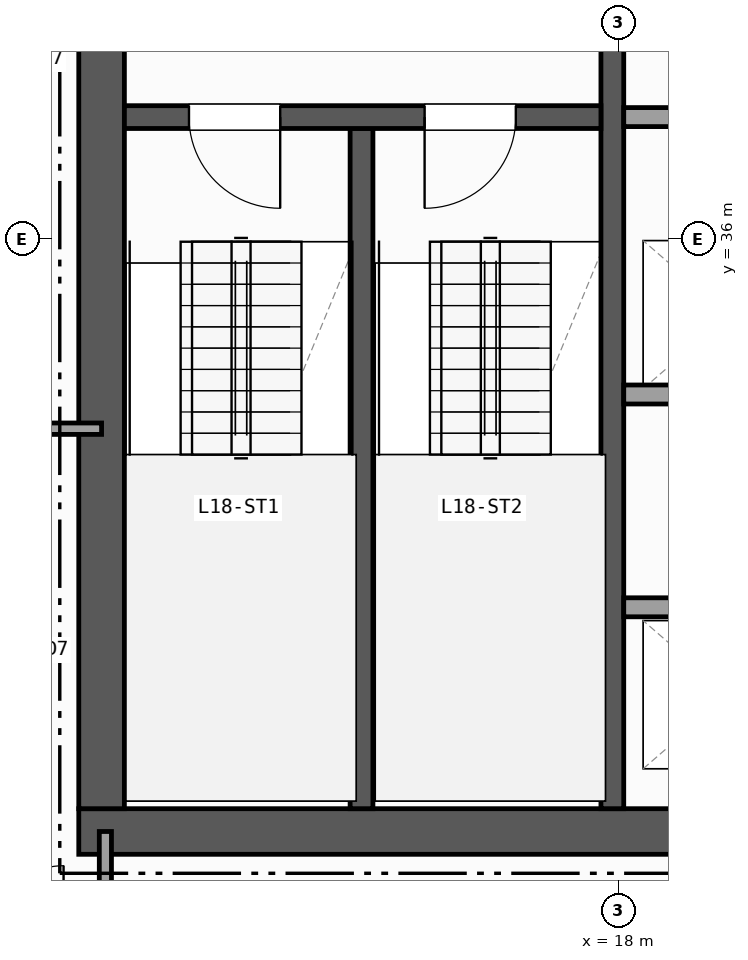
"""IFC4 building model, lengths in metres.
Left out: names, types, materials, properties, quantities, classifications, styles, units other than length and angle.
Written with IfcOpenShell. Run it as: python <this file> out.ifc"""

import sys

from ifc_helpers import new_model, si_unit, direction, frame, frame_2d, origin, place, context, subcontext, project, spatial, rectangle, extrude, element, fill, save


model = new_model("IFC4")
c1 = context("Model", 3, precision=1e-05, world=origin(), true_north=direction((0.0, 1.0)))
c2 = subcontext(c1, "Body", "Model", "MODEL_VIEW")
j1 = project(units=[si_unit("LENGTHUNIT", "METRE"), si_unit("PLANEANGLEUNIT", "RADIAN")], contexts=[c1])
p1 = place(None, origin())
s1 = spatial("IfcSite", under=j1, at=p1, CompositionType="ELEMENT")
p2 = place(p1, origin())
s2 = spatial("IfcBuilding", under=s1, at=p2, CompositionType="ELEMENT")
p3 = place(p2, frame((0.0, 0.0, 76.7)))
s3 = spatial("IfcBuildingStorey", under=s2, at=p3, CompositionType="ELEMENT", Elevation=76.7)
p4 = place(p3, frame((10.9, 28.2, 0.0), z_axis=(0.0, 0.0, 1.0), x_axis=(1.0, 0.0, 0.0)))
e1 = element("IfcWall", 1, at=p4, inside=s3, PredefinedType="SHEAR", context=c2, shape_type="SweptSolid", body=[
    extrude(rectangle(XDim=14.0, YDim=0.6, at=frame_2d((7.0, 0.0))), origin(), (0.0, 0.0, 1.0), 3.42),
])
p5 = place(p3, frame((11.2, 42.1, 0.0), z_axis=(0.0, 0.0, 1.0), x_axis=(0.0, -1.0, 0.0)))
e2 = element("IfcWall", 2, at=p5, inside=s3, PredefinedType="SHEAR", context=c2, shape_type="SweptSolid", body=[
    extrude(rectangle(XDim=13.6, YDim=0.6, at=frame_2d((6.8, 0.0))), origin(), (0.0, 0.0, 1.0), 3.42),
])
p6 = place(p3, frame((14.62, 28.5, 0.0), z_axis=(0.0, 0.0, 1.0), x_axis=(0.0, 1.0, 0.0)))
e3 = element("IfcWall", 3, at=p6, inside=s3, PredefinedType="SHEAR", context=c2, shape_type="SweptSolid", body=[
    extrude(rectangle(XDim=8.95, YDim=0.3, at=frame_2d((4.475, 0.0))), origin(), (0.0, 0.0, 1.0), 3.42),
])
p7 = place(p3, frame((17.92, 42.1, 0.0), z_axis=(0.0, 0.0, 1.0), x_axis=(0.0, -1.0, 0.0)))
e4 = element("IfcWall", 4, at=p7, inside=s3, PredefinedType="SHEAR", context=c2, shape_type="SweptSolid", body=[
    extrude(rectangle(XDim=13.6, YDim=0.3, at=frame_2d((6.8, 0.0))), origin(), (0.0, 0.0, 1.0), 3.42),
])
p8 = place(p7, frame((1.925, 0.0, 0.0)))
e5 = element("IfcOpeningElement", 5, at=p8, cuts=e4, PredefinedType="OPENING", context=c2, shape_type="SweptSolid", body=[
    extrude(rectangle(XDim=1.15, YDim=2.15, at=frame_2d((0.575, 1.075))), frame((0.0, 0.16, 0.0), z_axis=(0.0, -1.0, 0.0), x_axis=(1.0, 0.0, 0.0)), (0.0, 0.0, 1.0), 0.32),
])
p9 = place(p3, frame((17.77, 37.6, 0.0), z_axis=(0.0, 0.0, 1.0), x_axis=(-1.0, 0.0, 0.0)))
e6 = element("IfcWall", 6, at=p9, inside=s3, PredefinedType="SHEAR", context=c2, shape_type="SweptSolid", body=[
    extrude(rectangle(XDim=6.27, YDim=0.3, at=frame_2d((3.135, 0.0))), origin(), (0.0, 0.0, 1.0), 3.42),
])
p10 = place(p9, frame((4.22, 0.0, 0.0)))
e7 = element("IfcOpeningElement", 7, at=p10, cuts=e6, PredefinedType="OPENING", context=c2, shape_type="SweptSolid", body=[
    extrude(rectangle(XDim=1.2, YDim=2.15, at=frame_2d((0.6, 1.075))), frame((0.0, 0.16, 0.0), z_axis=(0.0, -1.0, 0.0), x_axis=(1.0, 0.0, 0.0)), (0.0, 0.0, 1.0), 0.32),
])
p11 = place(p9, frame((1.12, 0.0, 0.0)))
e8 = element("IfcOpeningElement", 8, at=p11, cuts=e6, PredefinedType="OPENING", context=c2, shape_type="SweptSolid", body=[
    extrude(rectangle(XDim=1.2, YDim=2.15, at=frame_2d((0.6, 1.075))), frame((0.0, 0.16, 0.0), z_axis=(0.0, -1.0, 0.0), x_axis=(1.0, 0.0, 0.0)), (0.0, 0.0, 1.0), 0.32),
])
for number, where, z_axis, x_axis in (
    (9, (18.07, 37.6, 0.0), (0.0, 0.0, 1.0), (1.0, 0.0, 0.0)),
    (10, (18.07, 31.15, 0.0), (0.0, 0.0, 1.0), (1.0, 0.0, 0.0)),
    (11, (24.3, 33.95, 0.0), (0.0, 0.0, 1.0), (-1.0, 0.0, 0.0)),
):
    element("IfcWall", number, at=place(p3, frame(where, z_axis=z_axis, x_axis=x_axis)), inside=s3, PredefinedType="PARTITIONING", context=c2, shape_type="SweptSolid", body=[
        extrude(rectangle(XDim=6.23, YDim=0.25, at=frame_2d((3.115, 0.0))), origin(), (0.0, 0.0, 1.0), 3.42),
    ])
p12 = place(p3, frame((9.0, 33.5, 0.0), z_axis=(0.0, 0.0, 1.0), x_axis=(1.0, 0.0, 0.0)))
e12 = element("IfcWall", 12, at=p12, inside=s3, PredefinedType="PARTITIONING", context=c2, shape_type="SweptSolid", body=[
    extrude(rectangle(XDim=2.2, YDim=0.15, at=frame_2d((1.1, 0.0))), origin(), (0.0, 0.0, 1.0), 2.627),
])
p13 = place(p12, frame((0.45, 0.0, 0.0)))
e13 = element("IfcOpeningElement", 13, at=p13, cuts=e12, PredefinedType="OPENING", context=c2, shape_type="SweptSolid", body=[
    extrude(rectangle(XDim=0.9, YDim=2.1, at=frame_2d((0.45, 1.05))), frame((0.0, 0.085, 0.0), z_axis=(0.0, -1.0, 0.0), x_axis=(1.0, 0.0, 0.0)), (0.0, 0.0, 1.0), 0.17),
])
p14 = place(p3, frame((11.25, 26.8, 0.0), z_axis=(0.0, 0.0, 1.0), x_axis=(0.0, 1.0, 0.0)))
e14 = element("IfcWall", 14, at=p14, inside=s3, PredefinedType="PARTITIONING", context=c2, shape_type="SweptSolid", body=[
    extrude(rectangle(XDim=1.4, YDim=0.16, at=frame_2d((0.7, 0.0))), origin(), (0.0, 0.0, 1.0), 2.789),
])
p15 = place(p10, origin())
e15 = element("IfcDoor", 15, at=p15, inside=s3, OperationType="SINGLE_SWING_LEFT", PredefinedType="DOOR", context=c2, shape_type="SweptSolid", body=[
    extrude(rectangle(XDim=1.2, YDim=2.15, at=frame_2d((0.6, 1.075))), frame((0.0, 0.025, 0.0), z_axis=(0.0, -1.0, 0.0), x_axis=(1.0, 0.0, 0.0)), (0.0, 0.0, 1.0), 0.05),
])
fill(e7, e15)
p16 = place(p11, origin())
e16 = element("IfcDoor", 16, at=p16, inside=s3, OperationType="SINGLE_SWING_RIGHT", PredefinedType="DOOR", context=c2, shape_type="SweptSolid", body=[
    extrude(rectangle(XDim=1.2, YDim=2.15, at=frame_2d((0.6, 1.075))), frame((0.0, 0.025, 0.0), z_axis=(0.0, -1.0, 0.0), x_axis=(1.0, 0.0, 0.0)), (0.0, 0.0, 1.0), 0.05),
])
fill(e8, e16)
save(model, sys.argv[1])
